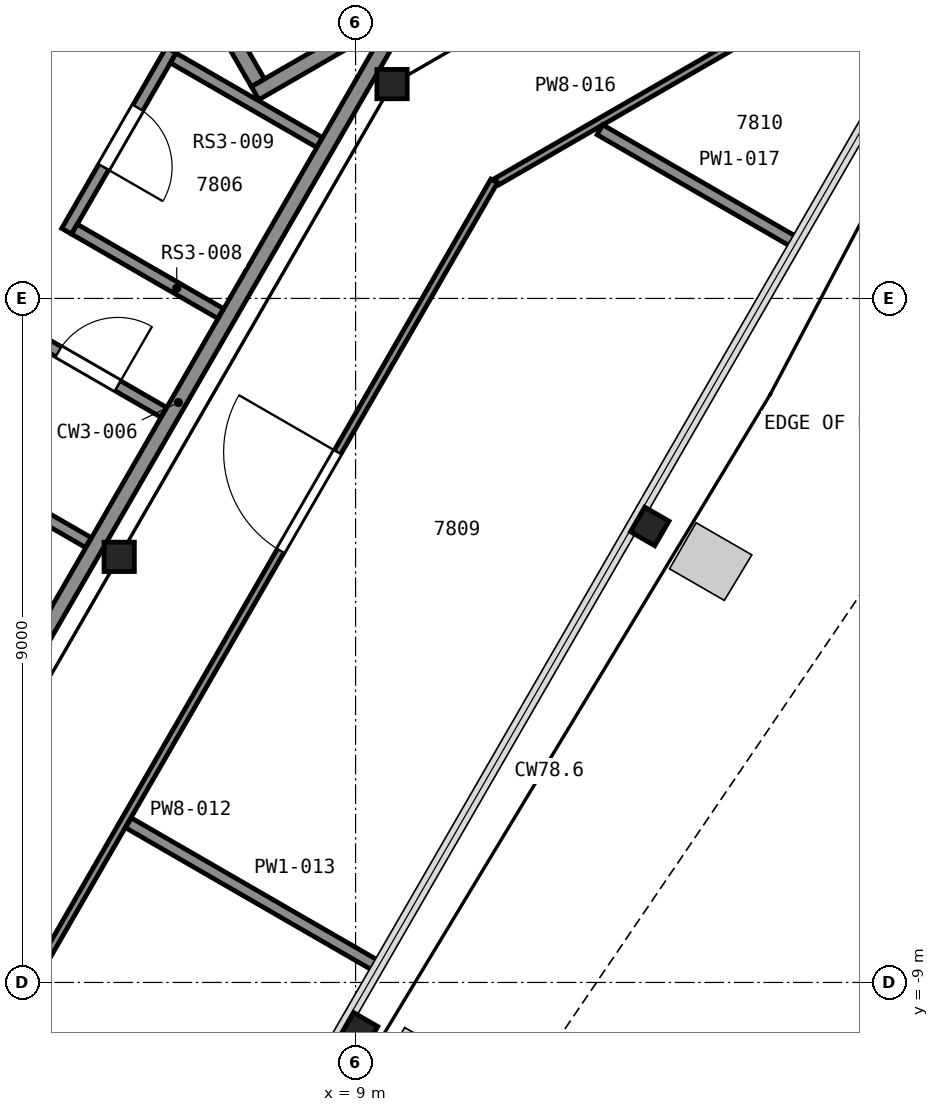
"""IFC4 building model, lengths in metres.
Left out: names, types, materials, properties, quantities, classifications, styles, units other than length and angle.
Written with IfcOpenShell. Run it as: python <this file> out.ifc"""

import sys

from ifc_helpers import new_model, si_unit, direction, frame, frame_2d, origin, origin_2d, place, context, subcontext, project, spatial, rectangle, i_section, extrude, element, fill, save


model = new_model("IFC4")
c1 = context("Model", 3, precision=1e-05, world=origin(), true_north=direction((0.0, 1.0)))
c2 = subcontext(c1, "Body", "Model", "MODEL_VIEW")
j1 = project(units=[si_unit("LENGTHUNIT", "METRE"), si_unit("PLANEANGLEUNIT", "RADIAN")], contexts=[c1])
p1 = place(None, origin())
s1 = spatial("IfcSite", under=j1, at=p1, CompositionType="ELEMENT")
p2 = place(p1, origin())
s2 = spatial("IfcBuilding", under=s1, at=p2, CompositionType="ELEMENT")
p3 = place(p2, frame((0.0, 0.0, 308.4)))
s3 = spatial("IfcBuildingStorey", under=s2, at=p3, CompositionType="ELEMENT", Elevation=308.4)
for number, where, z_axis, x_axis in (
    (1, (9.04, -9.65, 0.045), (0.0, 0.0, 1.0), (-0.5, -0.866, 0.0)),
    (2, (12.87, -3.0, 0.045), (0.0, 0.0, 1.0), (-0.5, -0.866, 0.0)),
):
    element("IfcColumn", number, at=place(p3, frame(where, z_axis=z_axis, x_axis=x_axis)), inside=s3, PredefinedType="COLUMN", context=c2, shape_type="SweptSolid", body=[
        extrude(i_section(OverallWidth=0.373, OverallDepth=0.368, WebThickness=0.015, FlangeThickness=0.024, FilletRadius=0.015, at=origin_2d()), origin(), (0.0, 0.0, 1.0), 4.155),
    ])
for number, where, z_axis, x_axis in (
    (3, (9.48, 2.82, 0.0), (0.0, 0.0, 1.0), (1.0, 0.0, 0.0)),
    (4, (5.89, -3.4, 0.0), (0.0, 0.0, 1.0), (1.0, 0.0, 0.0)),
):
    element("IfcColumn", number, at=place(p3, frame(where, z_axis=z_axis, x_axis=x_axis)), inside=s3, PredefinedType="COLUMN", context=c2, shape_type="SweptSolid", body=[
        extrude(i_section(OverallWidth=0.399, OverallDepth=0.386, WebThickness=0.021, FlangeThickness=0.033, FilletRadius=0.015, at=origin_2d()), origin(), (0.0, 0.0, 1.0), 4.2),
    ])
p4 = place(p3, frame((7.678, 2.701, 0.0), z_axis=(0.0, 0.0, 1.0), x_axis=(0.866018442252, 0.500012057535, 0.0)))
e5 = element("IfcWall", 5, at=p4, inside=s3, PredefinedType="PARTITIONING", context=c2, shape_type="SweptSolid", body=[
    extrude(rectangle(XDim=7.2, YDim=0.2, at=frame_2d((3.6, 0.0))), origin(), (0.0, 0.0, 1.0), 3.95),
])
p5 = place(p3, frame((7.715, 2.838, 0.0), z_axis=(0.0, 0.0, 1.0), x_axis=(-0.500049511043, 0.865996816683, 0.0)))
e6 = element("IfcWall", 6, at=p5, inside=s3, PredefinedType="PARTITIONING", context=c2, shape_type="SweptSolid", body=[
    extrude(rectangle(XDim=2.8, YDim=0.2, at=frame_2d((1.4, 0.0))), origin(), (0.0, 0.0, 1.0), 3.95),
])
p6 = place(p3, frame((3.478, -2.054, 0.0), z_axis=(0.0, 0.0, 1.0), x_axis=(0.865957384972, -0.500117793536, 0.0)))
e7 = element("IfcWall", 7, at=p6, inside=s3, PredefinedType="PARTITIONING", context=c2, shape_type="SweptSolid", body=[
    extrude(rectangle(XDim=2.316, YDim=0.15, at=frame_2d((1.158, 0.0))), origin(), (0.0, 0.0, 1.0), 3.95),
])
p7 = place(p3, frame((3.828, -6.29, 0.0), z_axis=(0.0, 0.0, 1.0), x_axis=(0.499979739078, 0.866037101117, 0.0)))
e8 = element("IfcWall", 8, at=p7, inside=s3, PredefinedType="PARTITIONING", context=c2, shape_type="SweptSolid", body=[
    extrude(rectangle(XDim=11.363, YDim=0.2, at=frame_2d((5.681, 0.0))), origin(), (0.0, 0.0, 1.0), 3.95),
])
p8 = place(p3, frame((6.474, -1.498, 0.0), z_axis=(0.0, 0.0, 1.0), x_axis=(-0.866112027296, 0.499849933654, 0.0)))
e9 = element("IfcWall", 9, at=p8, inside=s3, PredefinedType="PARTITIONING", context=c2, shape_type="SweptSolid", body=[
    extrude(rectangle(XDim=2.321, YDim=0.15, at=frame_2d((1.161, 0.0))), origin(), (0.0, 0.0, 1.0), 3.95),
])
p9 = place(p8, frame((0.696, 0.0, 0.0)))
e10 = element("IfcOpeningElement", 10, at=p9, cuts=e9, PredefinedType="OPENING", context=c2, shape_type="SweptSolid", body=[
    extrude(rectangle(XDim=0.9, YDim=2.1, at=frame_2d((0.45, 1.05))), frame((0.0, 0.085, 0.0), z_axis=(0.0, -1.0, 0.0), x_axis=(1.0, 0.0, 0.0)), (0.0, 0.0, 1.0), 0.17),
])
p10 = place(p3, frame((6.573, 3.266, 0.0), z_axis=(0.0, 0.0, 1.0), x_axis=(-0.499958106649, -0.866049589571, 0.0)))
e11 = element("IfcWall", 11, at=p10, inside=s3, PredefinedType="PARTITIONING", context=c2, shape_type="SweptSolid", body=[
    extrude(rectangle(XDim=2.75, YDim=0.15, at=frame_2d((1.375, 0.0))), origin(), (0.0, 0.0, 1.0), 3.95),
])
p11 = place(p10, frame((0.875, 0.0, 0.0)))
e12 = element("IfcOpeningElement", 12, at=p11, cuts=e11, PredefinedType="OPENING", context=c2, shape_type="SweptSolid", body=[
    extrude(rectangle(XDim=0.9, YDim=2.1, at=frame_2d((0.45, 1.05))), frame((0.0, 0.085, 0.0), z_axis=(0.0, -1.0, 0.0), x_axis=(1.0, 0.0, 0.0)), (0.0, 0.0, 1.0), 0.17),
])
for number, where, z_axis, x_axis in (
    (13, (5.301, 0.912, 0.0), (0.0, 0.0, 1.0), (0.866, -0.5, 0.0)),
    (14, (6.601, 3.164, 0.0), (0.0, 0.0, 1.0), (0.866, -0.5, 0.0)),
):
    element("IfcWall", number, at=place(p3, frame(where, z_axis=z_axis, x_axis=x_axis)), inside=s3, PredefinedType="PARTITIONING", context=c2, shape_type="SweptSolid", body=[
        extrude(rectangle(XDim=2.22, YDim=0.15, at=frame_2d((1.11, 0.0))), origin(), (0.0, 0.0, 1.0), 3.95),
    ])
p12 = place(p3, frame((10.823, 1.545, 0.0), z_axis=(0.0, 0.0, 1.0), x_axis=(-0.499912942625, -0.866075660549, 0.0)))
e15 = element("IfcWall", 15, at=p12, inside=s3, PredefinedType="PARTITIONING", context=c2, shape_type="SweptSolid", body=[
    extrude(rectangle(XDim=13.499, YDim=0.1, at=frame_2d((6.749, 0.0))), origin(), (0.0, 0.0, 1.0), 3.297),
])
p13 = place(p12, frame((4.119, 0.0, 0.0)))
e16 = element("IfcOpeningElement", 16, at=p13, cuts=e15, PredefinedType="OPENING", context=c2, shape_type="SweptSolid", body=[
    extrude(rectangle(XDim=1.5, YDim=2.1, at=frame_2d((0.75, 1.05))), frame((0.0, 0.06, 0.0), z_axis=(0.0, -1.0, 0.0), x_axis=(1.0, 0.0, 0.0)), (0.0, 0.0, 1.0), 0.12),
])
p14 = place(p3, frame((6.012, -6.899, 0.0), z_axis=(0.0, 0.0, 1.0), x_axis=(0.866034889475, -0.499983569942, 0.0)))
e17 = element("IfcWall", 17, at=p14, inside=s3, PredefinedType="PARTITIONING", context=c2, shape_type="SweptSolid", body=[
    extrude(rectangle(XDim=3.777, YDim=0.15, at=frame_2d((1.889, 0.0))), origin(), (0.0, 0.0, 1.0), 3.297),
])
p15 = place(p3, frame((17.361, 5.29, 0.0), z_axis=(0.0, 0.0, 1.0), x_axis=(-0.866105995393, -0.499860385252, 0.0)))
e18 = element("IfcWall", 18, at=p15, inside=s3, PredefinedType="PARTITIONING", context=c2, shape_type="SweptSolid", body=[
    extrude(rectangle(XDim=7.508, YDim=0.1, at=frame_2d((3.754, 0.0))), origin(), (0.0, 0.0, 1.0), 3.297),
])
p16 = place(p15, frame((2.343, 0.0, 0.0)))
e19 = element("IfcOpeningElement", 19, at=p16, cuts=e18, PredefinedType="OPENING", context=c2, shape_type="SweptSolid", body=[
    extrude(rectangle(XDim=1.5, YDim=2.1, at=frame_2d((0.75, 1.05))), frame((0.0, 0.06, 0.0), z_axis=(0.0, -1.0, 0.0), x_axis=(1.0, 0.0, 0.0)), (0.0, 0.0, 1.0), 0.12),
])
p17 = place(p3, frame((12.215, 2.219, 0.0), z_axis=(0.0, 0.0, 1.0), x_axis=(0.865983964866, -0.500071767444, 0.0)))
e20 = element("IfcWall", 20, at=p17, inside=s3, PredefinedType="PARTITIONING", context=c2, shape_type="SweptSolid", body=[
    extrude(rectangle(XDim=2.964, YDim=0.15, at=frame_2d((1.482, 0.0))), origin(), (0.0, 0.0, 1.0), 3.297),
])
p18 = place(p9, origin())
e21 = element("IfcDoor", 21, at=p18, inside=s3, OperationType="SINGLE_SWING_LEFT", PredefinedType="DOOR", context=c2, shape_type="SweptSolid", body=[
    extrude(rectangle(XDim=0.9, YDim=2.1, at=frame_2d((0.45, 1.05))), frame((0.0, 0.025, 0.0), z_axis=(0.0, -1.0, 0.0), x_axis=(1.0, 0.0, 0.0)), (0.0, 0.0, 1.0), 0.05),
])
fill(e10, e21)
p19 = place(p11, origin())
e22 = element("IfcDoor", 22, at=p19, inside=s3, OperationType="SINGLE_SWING_RIGHT", PredefinedType="DOOR", context=c2, shape_type="SweptSolid", body=[
    extrude(rectangle(XDim=0.9, YDim=2.1, at=frame_2d((0.45, 1.05))), frame((0.0, 0.025, 0.0), z_axis=(0.0, -1.0, 0.0), x_axis=(1.0, 0.0, 0.0)), (0.0, 0.0, 1.0), 0.05),
])
fill(e12, e22)
p20 = place(p13, origin())
e23 = element("IfcDoor", 23, at=p20, inside=s3, OperationType="DOUBLE_DOOR_SINGLE_SWING", PredefinedType="DOOR", context=c2, shape_type="SweptSolid", body=[
    extrude(rectangle(XDim=1.5, YDim=2.1, at=frame_2d((0.75, 1.05))), frame((0.0, 0.025, 0.0), z_axis=(0.0, -1.0, 0.0), x_axis=(1.0, 0.0, 0.0)), (0.0, 0.0, 1.0), 0.05),
])
fill(e16, e23)
save(model, sys.argv[1])
